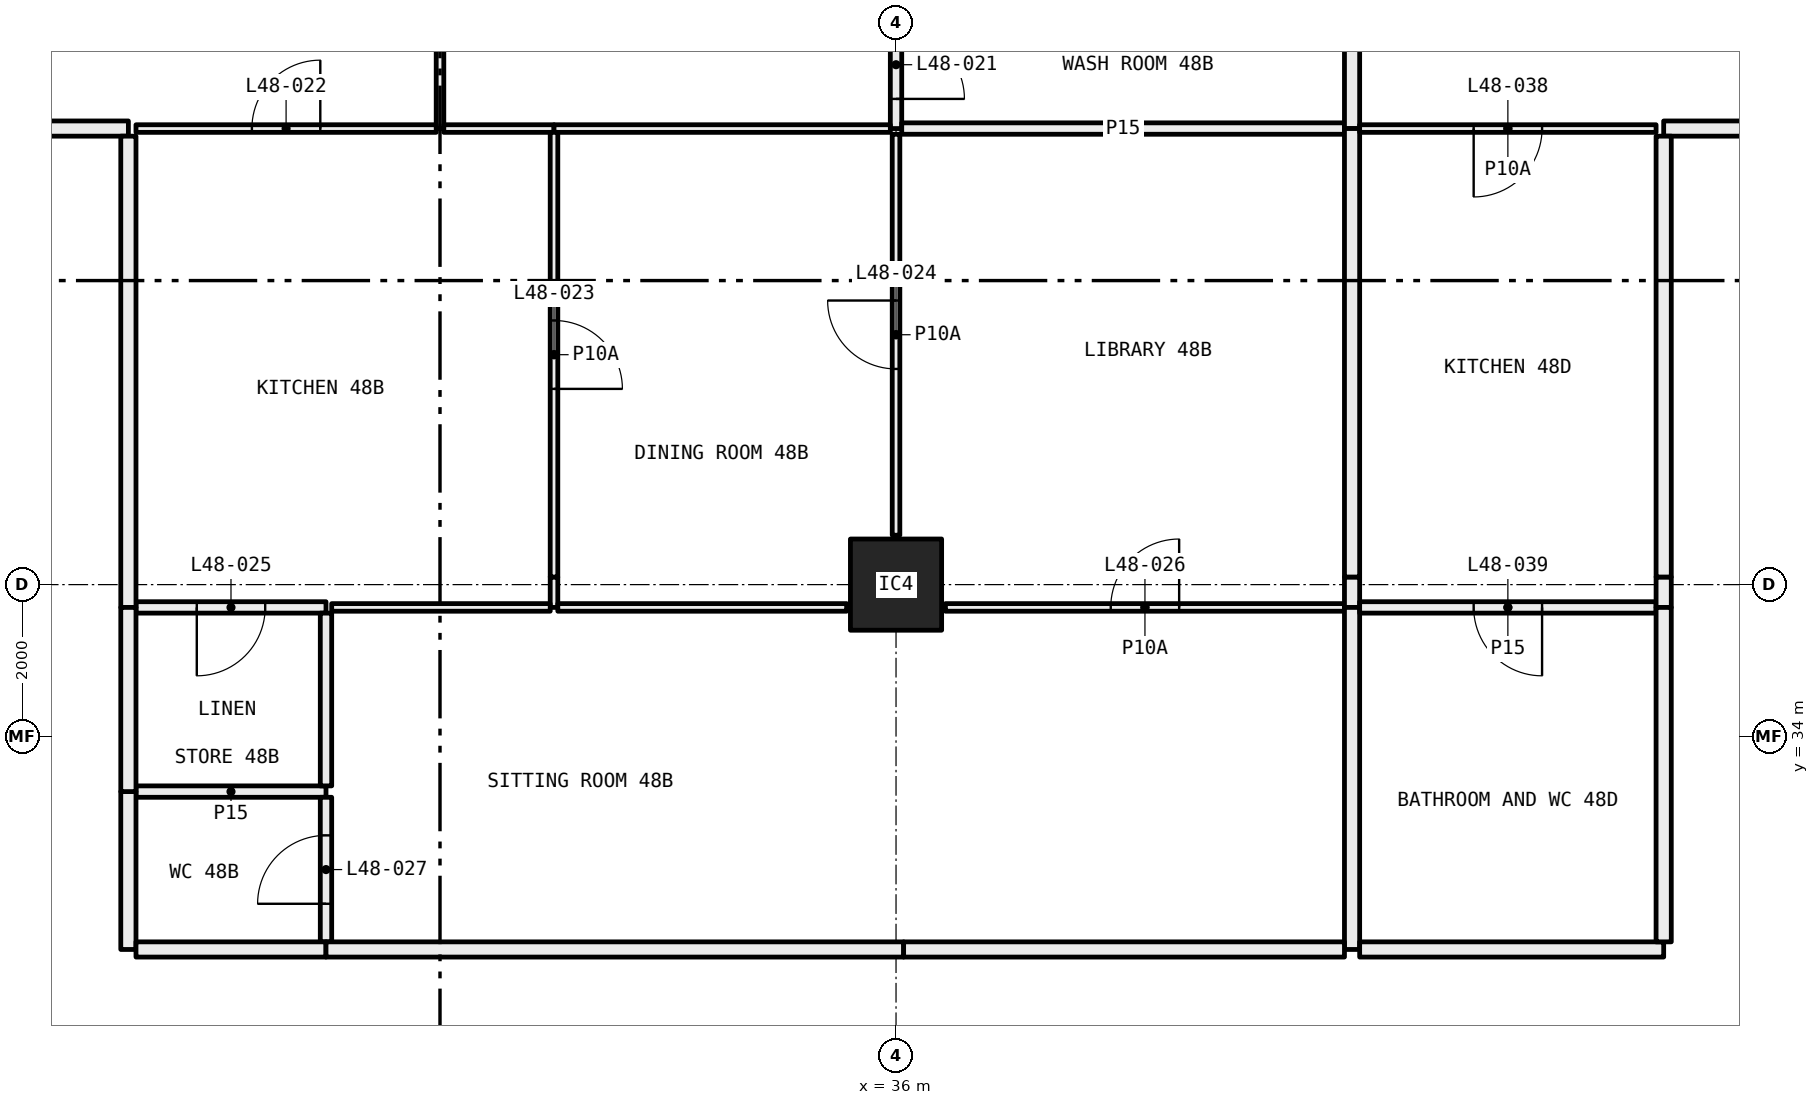
"""IFC4 building model, lengths in metres.
Left out: names, types, materials, properties, quantities, classifications, styles, units other than length and angle.
Written with IfcOpenShell. Run it as: python <this file> out.ifc"""

import sys

from ifc_helpers import new_model, si_unit, direction, frame, frame_2d, origin, origin_2d, place, context, subcontext, project, spatial, rectangle, hollow_rectangle, extrude, element, fill, save


model = new_model("IFC4")
c1 = context("Model", 3, precision=1e-05, world=origin(), true_north=direction((0.0, 1.0)))
c2 = subcontext(c1, "Body", "Model", "MODEL_VIEW")
j1 = project(units=[si_unit("LENGTHUNIT", "METRE"), si_unit("PLANEANGLEUNIT", "RADIAN")], contexts=[c1])
p1 = place(None, origin())
s1 = spatial("IfcSite", under=j1, at=p1, CompositionType="ELEMENT")
p2 = place(p1, origin())
s2 = spatial("IfcBuilding", under=s1, at=p2, CompositionType="ELEMENT")
p3 = place(p2, frame((0.0, 0.0, 182.4)))
s3 = spatial("IfcBuildingStorey", under=s2, at=p3, CompositionType="ELEMENT", Elevation=182.4)
p4 = place(p3, frame((36.0, 36.0, 0.0), z_axis=(0.0, 0.0, 1.0), x_axis=(1.0, 0.0, 0.0)))
e1 = element("IfcColumn", 1, at=p4, inside=s3, PredefinedType="COLUMN", context=c2, shape_type="SweptSolid", body=[
    extrude(hollow_rectangle(XDim=1.2, YDim=1.2, WallThickness=0.05, at=origin_2d()), origin(), (0.0, 0.0, 1.0), 3.05),
])
p5 = place(p3, frame((30.0, 42.0, 0.0), z_axis=(0.0, 0.0, 1.0), x_axis=(0.0, 1.0, 0.0)))
e2 = element("IfcWall", 2, at=p5, inside=s3, PredefinedType="PARTITIONING", context=c2, shape_type="SweptSolid", body=[
    extrude(rectangle(XDim=5.28, YDim=0.1, at=frame_2d((2.64, 0.0))), origin(), (0.0, 0.0, 1.0), 3.05),
])
p6 = place(p5, frame((2.19, 0.0, 0.0)))
e3 = element("IfcOpeningElement", 3, at=p6, cuts=e2, PredefinedType="OPENING", context=c2, shape_type="SweptSolid", body=[
    extrude(rectangle(XDim=0.9, YDim=2.1, at=frame_2d((0.45, 1.05))), frame((0.0, 0.06, 0.0), z_axis=(0.0, -1.0, 0.0), x_axis=(1.0, 0.0, 0.0)), (0.0, 0.0, 1.0), 0.12),
])
p7 = place(p3, frame((26.0, 42.0, 0.0), z_axis=(0.0, 0.0, 1.0), x_axis=(1.0, 0.0, 0.0)))
e4 = element("IfcWall", 4, at=p7, inside=s3, PredefinedType="PARTITIONING", context=c2, shape_type="SweptSolid", body=[
    extrude(rectangle(XDim=3.95, YDim=0.1, at=frame_2d((1.975, 0.0))), origin(), (0.0, 0.0, 1.0), 3.05),
])
p8 = place(p7, frame((1.525, 0.0, 0.0)))
e5 = element("IfcOpeningElement", 5, at=p8, cuts=e4, PredefinedType="OPENING", context=c2, shape_type="SweptSolid", body=[
    extrude(rectangle(XDim=0.9, YDim=2.1, at=frame_2d((0.45, 1.05))), frame((0.0, 0.06, 0.0), z_axis=(0.0, -1.0, 0.0), x_axis=(1.0, 0.0, 0.0)), (0.0, 0.0, 1.0), 0.12),
])
p9 = place(p3, frame((24.0, 42.0, 0.0), z_axis=(0.0, 0.0, 1.0), x_axis=(1.0, 0.0, 0.0)))
e6 = element("IfcWall", 6, at=p9, inside=s3, PredefinedType="PARTITIONING", context=c2, shape_type="SweptSolid", body=[
    extrude(rectangle(XDim=1.9, YDim=0.2, at=frame_2d((0.95, 0.0))), origin(), (0.0, 0.0, 1.0), 3.05),
])
p10 = place(p3, frame((36.0, 42.0, 0.0), z_axis=(0.0, 0.0, 1.0), x_axis=(0.0, 1.0, 0.0)))
e7 = element("IfcWall", 7, at=p10, inside=s3, PredefinedType="PARTITIONING", context=c2, shape_type="SweptSolid", body=[
    extrude(rectangle(XDim=1.68, YDim=0.15, at=frame_2d((0.84, 0.0))), origin(), (0.0, 0.0, 1.0), 2.45),
])
p11 = place(p10, frame((0.39, 0.0, 0.0)))
e8 = element("IfcOpeningElement", 8, at=p11, cuts=e7, PredefinedType="OPENING", context=c2, shape_type="SweptSolid", body=[
    extrude(rectangle(XDim=0.9, YDim=2.1, at=frame_2d((0.45, 1.05))), frame((0.0, 0.085, 0.0), z_axis=(0.0, -1.0, 0.0), x_axis=(1.0, 0.0, 0.0)), (0.0, 0.0, 1.0), 0.17),
])
p12 = place(p3, frame((30.05, 42.0, 0.0), z_axis=(0.0, 0.0, 1.0), x_axis=(1.0, 0.0, 0.0)))
e9 = element("IfcWall", 9, at=p12, inside=s3, PredefinedType="PARTITIONING", context=c2, shape_type="SweptSolid", body=[
    extrude(rectangle(XDim=1.45, YDim=0.1, at=frame_2d((0.725, 0.0))), origin(), (0.0, 0.0, 1.0), 3.05),
])
p13 = place(p3, frame((31.5, 42.0, 0.0), z_axis=(0.0, 0.0, 1.0), x_axis=(1.0, 0.0, 0.0)))
e10 = element("IfcWall", 10, at=p13, inside=s3, PredefinedType="PARTITIONING", context=c2, shape_type="SweptSolid", body=[
    extrude(rectangle(XDim=4.425, YDim=0.1, at=frame_2d((2.212, 0.0))), origin(), (0.0, 0.0, 1.0), 2.45),
])
p14 = place(p3, frame((36.075, 42.0, 0.0), z_axis=(0.0, 0.0, 1.0), x_axis=(1.0, 0.0, 0.0)))
e11 = element("IfcWall", 11, at=p14, inside=s3, PredefinedType="PARTITIONING", context=c2, shape_type="SweptSolid", body=[
    extrude(rectangle(XDim=5.825, YDim=0.15, at=frame_2d((2.913, 0.0))), origin(), (0.0, 0.0, 1.0), 2.45),
])
p15 = place(p3, frame((42.0, 42.0, 0.0), z_axis=(0.0, 0.0, 1.0), x_axis=(0.0, 1.0, 0.0)))
e12 = element("IfcWall", 12, at=p15, inside=s3, PredefinedType="PARTITIONING", context=c2, shape_type="SweptSolid", body=[
    extrude(rectangle(XDim=1.68, YDim=0.2, at=frame_2d((0.84, 0.0))), origin(), (0.0, 0.0, 1.0), 3.05),
])
p16 = place(p3, frame((31.5, 35.7, 0.0), z_axis=(0.0, 0.0, 1.0), x_axis=(0.0, 1.0, 0.0)))
e13 = element("IfcWall", 13, at=p16, inside=s3, PredefinedType="PARTITIONING", context=c2, shape_type="SweptSolid", body=[
    extrude(rectangle(XDim=0.4, YDim=0.1, at=frame_2d((0.2, 0.0))), origin(), (0.0, 0.0, 1.0), 2.45),
])
p17 = place(p3, frame((31.5, 36.1, 0.0), z_axis=(0.0, 0.0, 1.0), x_axis=(0.0, 1.0, 0.0)))
e14 = element("IfcWall", 14, at=p17, inside=s3, PredefinedType="PARTITIONING", context=c2, shape_type="SweptSolid", body=[
    extrude(rectangle(XDim=5.85, YDim=0.1, at=frame_2d((2.925, 0.0))), origin(), (0.0, 0.0, 1.0), 3.05),
])
p18 = place(p17, frame((2.475, 0.0, 0.0)))
e15 = element("IfcOpeningElement", 15, at=p18, cuts=e14, PredefinedType="OPENING", context=c2, shape_type="SweptSolid", body=[
    extrude(rectangle(XDim=0.9, YDim=2.1, at=frame_2d((0.45, 1.05))), frame((0.0, 0.06, 0.0), z_axis=(0.0, -1.0, 0.0), x_axis=(1.0, 0.0, 0.0)), (0.0, 0.0, 1.0), 0.12),
])
p19 = place(p3, frame((26.0, 35.7, 0.0), z_axis=(0.0, 0.0, 1.0), x_axis=(1.0, 0.0, 0.0)))
e16 = element("IfcWall", 16, at=p19, inside=s3, PredefinedType="PARTITIONING", context=c2, shape_type="SweptSolid", body=[
    extrude(rectangle(XDim=2.5, YDim=0.15, at=frame_2d((1.25, 0.0))), origin(), (0.0, 0.0, 1.0), 3.05),
])
p20 = place(p19, frame((0.8, 0.0, 0.0)))
e17 = element("IfcOpeningElement", 17, at=p20, cuts=e16, PredefinedType="OPENING", context=c2, shape_type="SweptSolid", body=[
    extrude(rectangle(XDim=0.9, YDim=2.1, at=frame_2d((0.45, 1.05))), frame((0.0, 0.085, 0.0), z_axis=(0.0, -1.0, 0.0), x_axis=(1.0, 0.0, 0.0)), (0.0, 0.0, 1.0), 0.17),
])
p21 = place(p3, frame((28.575, 35.7, 0.0), z_axis=(0.0, 0.0, 1.0), x_axis=(1.0, 0.0, 0.0)))
e18 = element("IfcWall", 18, at=p21, inside=s3, PredefinedType="PARTITIONING", context=c2, shape_type="SweptSolid", body=[
    extrude(rectangle(XDim=2.875, YDim=0.1, at=frame_2d((1.438, 0.0))), origin(), (0.0, 0.0, 1.0), 3.05),
])
p22 = place(p3, frame((25.9, 41.9, 0.0), z_axis=(0.0, 0.0, 1.0), x_axis=(0.0, -1.0, 0.0)))
e19 = element("IfcWall", 19, at=p22, inside=s3, PredefinedType="PARTITIONING", context=c2, shape_type="SweptSolid", body=[
    extrude(rectangle(XDim=6.2, YDim=0.2, at=frame_2d((3.1, 0.0))), origin(), (0.0, 0.0, 1.0), 2.45),
])
p23 = place(p3, frame((36.0, 36.65, 0.0), z_axis=(0.0, 0.0, 1.0), x_axis=(0.0, 1.0, 0.0)))
e20 = element("IfcWall", 20, at=p23, inside=s3, PredefinedType="PARTITIONING", context=c2, shape_type="SweptSolid", body=[
    extrude(rectangle(XDim=5.275, YDim=0.1, at=frame_2d((2.638, 0.0))), origin(), (0.0, 0.0, 1.0), 2.45),
])
p24 = place(p23, frame((2.188, 0.0, 0.0)))
e21 = element("IfcOpeningElement", 21, at=p24, cuts=e20, PredefinedType="OPENING", context=c2, shape_type="SweptSolid", body=[
    extrude(rectangle(XDim=0.9, YDim=2.1, at=frame_2d((0.45, 1.05))), frame((0.0, 0.06, 0.0), z_axis=(0.0, -1.0, 0.0), x_axis=(1.0, 0.0, 0.0)), (0.0, 0.0, 1.0), 0.12),
])
p25 = place(p3, frame((31.55, 35.7, 0.0), z_axis=(0.0, 0.0, 1.0), x_axis=(1.0, 0.0, 0.0)))
e22 = element("IfcWall", 22, at=p25, inside=s3, PredefinedType="PARTITIONING", context=c2, shape_type="SweptSolid", body=[
    extrude(rectangle(XDim=3.8, YDim=0.1, at=frame_2d((1.9, 0.0))), origin(), (0.0, 0.0, 1.0), 3.05),
])
p26 = place(p3, frame((36.65, 35.7, 0.0), z_axis=(0.0, 0.0, 1.0), x_axis=(1.0, 0.0, 0.0)))
e23 = element("IfcWall", 23, at=p26, inside=s3, PredefinedType="PARTITIONING", context=c2, shape_type="SweptSolid", body=[
    extrude(rectangle(XDim=5.25, YDim=0.1, at=frame_2d((2.625, 0.0))), origin(), (0.0, 0.0, 1.0), 3.05),
])
p27 = place(p26, frame((2.175, 0.0, 0.0)))
e24 = element("IfcOpeningElement", 24, at=p27, cuts=e23, PredefinedType="OPENING", context=c2, shape_type="SweptSolid", body=[
    extrude(rectangle(XDim=0.9, YDim=2.1, at=frame_2d((0.45, 1.05))), frame((0.0, 0.06, 0.0), z_axis=(0.0, -1.0, 0.0), x_axis=(1.0, 0.0, 0.0)), (0.0, 0.0, 1.0), 0.12),
])
p28 = place(p3, frame((42.0, 35.7, 0.0), z_axis=(0.0, 0.0, 1.0), x_axis=(0.0, 1.0, 0.0)))
e25 = element("IfcWall", 25, at=p28, inside=s3, PredefinedType="PARTITIONING", context=c2, shape_type="SweptSolid", body=[
    extrude(rectangle(XDim=0.4, YDim=0.2, at=frame_2d((0.2, 0.0))), origin(), (0.0, 0.0, 1.0), 2.45),
])
p29 = place(p3, frame((42.0, 36.1, 0.0), z_axis=(0.0, 0.0, 1.0), x_axis=(0.0, 1.0, 0.0)))
e26 = element("IfcWall", 26, at=p29, inside=s3, PredefinedType="PARTITIONING", context=c2, shape_type="SweptSolid", body=[
    extrude(rectangle(XDim=5.9, YDim=0.2, at=frame_2d((2.95, 0.0))), origin(), (0.0, 0.0, 1.0), 3.05),
])
p30 = place(p3, frame((28.5, 33.277, 0.0), z_axis=(0.0, 0.0, 1.0), x_axis=(-1.0, 0.0, 0.0)))
e27 = element("IfcWall", 27, at=p30, inside=s3, PredefinedType="PARTITIONING", context=c2, shape_type="SweptSolid", body=[
    extrude(rectangle(XDim=2.5, YDim=0.15, at=frame_2d((1.25, 0.0))), origin(), (0.0, 0.0, 1.0), 3.05),
])
p31 = place(p3, frame((28.5, 31.3, 0.0), z_axis=(0.0, 0.0, 1.0), x_axis=(0.0, 1.0, 0.0)))
e28 = element("IfcWall", 28, at=p31, inside=s3, PredefinedType="PARTITIONING", context=c2, shape_type="SweptSolid", body=[
    extrude(rectangle(XDim=1.902, YDim=0.15, at=frame_2d((0.951, 0.0))), origin(), (0.0, 0.0, 1.0), 3.05),
])
p32 = place(p31, frame((0.501, 0.0, 0.0)))
e29 = element("IfcOpeningElement", 29, at=p32, cuts=e28, PredefinedType="OPENING", context=c2, shape_type="SweptSolid", body=[
    extrude(rectangle(XDim=0.9, YDim=2.1, at=frame_2d((0.45, 1.05))), frame((0.0, 0.085, 0.0), z_axis=(0.0, -1.0, 0.0), x_axis=(1.0, 0.0, 0.0)), (0.0, 0.0, 1.0), 0.17),
])
p33 = place(p3, frame((25.9, 33.277, 0.0), z_axis=(0.0, 0.0, 1.0), x_axis=(0.0, -1.0, 0.0)))
e30 = element("IfcWall", 30, at=p33, inside=s3, PredefinedType="PARTITIONING", context=c2, shape_type="SweptSolid", body=[
    extrude(rectangle(XDim=2.077, YDim=0.2, at=frame_2d((1.039, 0.0))), origin(), (0.0, 0.0, 1.0), 3.05),
])
p34 = place(p3, frame((26.0, 31.2, 0.0), z_axis=(0.0, 0.0, 1.0), x_axis=(1.0, 0.0, 0.0)))
e31 = element("IfcWall", 31, at=p34, inside=s3, PredefinedType="PARTITIONING", context=c2, shape_type="SweptSolid", body=[
    extrude(rectangle(XDim=2.5, YDim=0.2, at=frame_2d((1.25, 0.0))), origin(), (0.0, 0.0, 1.0), 3.05),
])
p35 = place(p3, frame((28.5, 33.352, 0.0), z_axis=(0.0, 0.0, 1.0), x_axis=(0.0, 1.0, 0.0)))
e32 = element("IfcWall", 32, at=p35, inside=s3, PredefinedType="PARTITIONING", context=c2, shape_type="SweptSolid", body=[
    extrude(rectangle(XDim=2.273, YDim=0.15, at=frame_2d((1.136, 0.0))), origin(), (0.0, 0.0, 1.0), 3.05),
])
p36 = place(p3, frame((25.9, 35.7, 0.0), z_axis=(0.0, 0.0, 1.0), x_axis=(0.0, -1.0, 0.0)))
e33 = element("IfcWall", 33, at=p36, inside=s3, PredefinedType="PARTITIONING", context=c2, shape_type="SweptSolid", body=[
    extrude(rectangle(XDim=2.423, YDim=0.2, at=frame_2d((1.211, 0.0))), origin(), (0.0, 0.0, 1.0), 3.05),
])
p37 = place(p3, frame((42.0, 31.2, 0.0), z_axis=(0.0, 0.0, 1.0), x_axis=(0.0, 1.0, 0.0)))
e34 = element("IfcWall", 34, at=p37, inside=s3, PredefinedType="PARTITIONING", context=c2, shape_type="SweptSolid", body=[
    extrude(rectangle(XDim=4.5, YDim=0.2, at=frame_2d((2.25, 0.0))), origin(), (0.0, 0.0, 1.0), 3.05),
])
p38 = place(p3, frame((28.5, 31.2, 0.0), z_axis=(0.0, 0.0, 1.0), x_axis=(1.0, 0.0, 0.0)))
e35 = element("IfcWall", 35, at=p38, inside=s3, PredefinedType="PARTITIONING", context=c2, shape_type="SweptSolid", body=[
    extrude(rectangle(XDim=7.6, YDim=0.2, at=frame_2d((3.8, 0.0))), origin(), (0.0, 0.0, 1.0), 2.45),
])
p39 = place(p3, frame((36.1, 31.2, 0.0), z_axis=(0.0, 0.0, 1.0), x_axis=(1.0, 0.0, 0.0)))
e36 = element("IfcWall", 36, at=p39, inside=s3, PredefinedType="PARTITIONING", context=c2, shape_type="SweptSolid", body=[
    extrude(rectangle(XDim=5.8, YDim=0.2, at=frame_2d((2.9, 0.0))), origin(), (0.0, 0.0, 1.0), 3.05),
])
p40 = place(p3, frame((42.1, 42.0, 0.0), z_axis=(0.0, 0.0, 1.0), x_axis=(1.0, 0.0, 0.0)))
e37 = element("IfcWall", 37, at=p40, inside=s3, PredefinedType="PARTITIONING", context=c2, shape_type="SweptSolid", body=[
    extrude(rectangle(XDim=3.9, YDim=0.1, at=frame_2d((1.95, 0.0))), origin(), (0.0, 0.0, 1.0), 3.05),
])
p41 = place(p40, frame((1.5, 0.0, 0.0)))
e38 = element("IfcOpeningElement", 38, at=p41, cuts=e37, PredefinedType="OPENING", context=c2, shape_type="SweptSolid", body=[
    extrude(rectangle(XDim=0.9, YDim=2.1, at=frame_2d((0.45, 1.05))), frame((0.0, 0.06, 0.0), z_axis=(0.0, -1.0, 0.0), x_axis=(1.0, 0.0, 0.0)), (0.0, 0.0, 1.0), 0.12),
])
p42 = place(p3, frame((46.1, 42.0, 0.0), z_axis=(0.0, 0.0, 1.0), x_axis=(1.0, 0.0, 0.0)))
e39 = element("IfcWall", 39, at=p42, inside=s3, PredefinedType="PARTITIONING", context=c2, shape_type="SweptSolid", body=[
    extrude(rectangle(XDim=1.9, YDim=0.2, at=frame_2d((0.95, 0.0))), origin(), (0.0, 0.0, 1.0), 3.05),
])
p43 = place(p3, frame((42.1, 35.7, 0.0), z_axis=(0.0, 0.0, 1.0), x_axis=(1.0, 0.0, 0.0)))
e40 = element("IfcWall", 40, at=p43, inside=s3, PredefinedType="PARTITIONING", context=c2, shape_type="SweptSolid", body=[
    extrude(rectangle(XDim=3.9, YDim=0.15, at=frame_2d((1.95, 0.0))), origin(), (0.0, 0.0, 1.0), 3.05),
])
p44 = place(p43, frame((1.5, 0.0, 0.0)))
e41 = element("IfcOpeningElement", 41, at=p44, cuts=e40, PredefinedType="OPENING", context=c2, shape_type="SweptSolid", body=[
    extrude(rectangle(XDim=0.9, YDim=2.1, at=frame_2d((0.45, 1.05))), frame((0.0, 0.085, 0.0), z_axis=(0.0, -1.0, 0.0), x_axis=(1.0, 0.0, 0.0)), (0.0, 0.0, 1.0), 0.17),
])
p45 = place(p3, frame((46.1, 35.7, 0.0), z_axis=(0.0, 0.0, 1.0), x_axis=(0.0, 1.0, 0.0)))
e42 = element("IfcWall", 42, at=p45, inside=s3, PredefinedType="PARTITIONING", context=c2, shape_type="SweptSolid", body=[
    extrude(rectangle(XDim=0.4, YDim=0.2, at=frame_2d((0.2, 0.0))), origin(), (0.0, 0.0, 1.0), 2.45),
])
p46 = place(p3, frame((46.1, 36.1, 0.0), z_axis=(0.0, 0.0, 1.0), x_axis=(0.0, 1.0, 0.0)))
e43 = element("IfcWall", 43, at=p46, inside=s3, PredefinedType="PARTITIONING", context=c2, shape_type="SweptSolid", body=[
    extrude(rectangle(XDim=5.8, YDim=0.2, at=frame_2d((2.9, 0.0))), origin(), (0.0, 0.0, 1.0), 3.05),
])
p47 = place(p3, frame((42.1, 31.2, 0.0), z_axis=(0.0, 0.0, 1.0), x_axis=(1.0, 0.0, 0.0)))
e44 = element("IfcWall", 44, at=p47, inside=s3, PredefinedType="PARTITIONING", context=c2, shape_type="SweptSolid", body=[
    extrude(rectangle(XDim=4.0, YDim=0.2, at=frame_2d((2.0, 0.0))), origin(), (0.0, 0.0, 1.0), 3.05),
])
p48 = place(p3, frame((46.1, 31.3, 0.0), z_axis=(0.0, 0.0, 1.0), x_axis=(0.0, 1.0, 0.0)))
e45 = element("IfcWall", 45, at=p48, inside=s3, PredefinedType="PARTITIONING", context=c2, shape_type="SweptSolid", body=[
    extrude(rectangle(XDim=4.4, YDim=0.2, at=frame_2d((2.2, 0.0))), origin(), (0.0, 0.0, 1.0), 3.05),
])
p49 = place(p11, frame((0.9, 0.0, 0.0), x_axis=(-1.0, 0.0, 0.0)))
e46 = element("IfcDoor", 46, at=p49, inside=s3, OperationType="SINGLE_SWING_LEFT", PredefinedType="DOOR", context=c2, shape_type="SweptSolid", body=[
    extrude(rectangle(XDim=0.9, YDim=2.1, at=frame_2d((0.45, 1.05))), frame((0.0, 0.025, 0.0), z_axis=(0.0, -1.0, 0.0), x_axis=(1.0, 0.0, 0.0)), (0.0, 0.0, 1.0), 0.05),
])
fill(e8, e46)
p50 = place(p8, origin())
e47 = element("IfcDoor", 47, at=p50, inside=s3, OperationType="SINGLE_SWING_LEFT", PredefinedType="DOOR", context=c2, shape_type="SweptSolid", body=[
    extrude(rectangle(XDim=0.9, YDim=2.1, at=frame_2d((0.45, 1.05))), frame((0.0, 0.025, 0.0), z_axis=(0.0, -1.0, 0.0), x_axis=(1.0, 0.0, 0.0)), (0.0, 0.0, 1.0), 0.05),
])
fill(e5, e47)
p51 = place(p18, frame((0.9, 0.0, 0.0), x_axis=(-1.0, 0.0, 0.0)))
e48 = element("IfcDoor", 48, at=p51, inside=s3, OperationType="SINGLE_SWING_LEFT", PredefinedType="DOOR", context=c2, shape_type="SweptSolid", body=[
    extrude(rectangle(XDim=0.9, YDim=2.1, at=frame_2d((0.45, 1.05))), frame((0.0, 0.025, 0.0), z_axis=(0.0, -1.0, 0.0), x_axis=(1.0, 0.0, 0.0)), (0.0, 0.0, 1.0), 0.05),
])
fill(e15, e48)
p52 = place(p24, origin())
e49 = element("IfcDoor", 49, at=p52, inside=s3, OperationType="SINGLE_SWING_LEFT", PredefinedType="DOOR", context=c2, shape_type="SweptSolid", body=[
    extrude(rectangle(XDim=0.9, YDim=2.1, at=frame_2d((0.45, 1.05))), frame((0.0, 0.025, 0.0), z_axis=(0.0, -1.0, 0.0), x_axis=(1.0, 0.0, 0.0)), (0.0, 0.0, 1.0), 0.05),
])
fill(e21, e49)
p53 = place(p20, frame((0.9, 0.0, 0.0), x_axis=(-1.0, 0.0, 0.0)))
e50 = element("IfcDoor", 50, at=p53, inside=s3, OperationType="SINGLE_SWING_LEFT", PredefinedType="DOOR", context=c2, shape_type="SweptSolid", body=[
    extrude(rectangle(XDim=0.9, YDim=2.1, at=frame_2d((0.45, 1.05))), frame((0.0, 0.025, 0.0), z_axis=(0.0, -1.0, 0.0), x_axis=(1.0, 0.0, 0.0)), (0.0, 0.0, 1.0), 0.05),
])
fill(e17, e50)
p54 = place(p27, origin())
e51 = element("IfcDoor", 51, at=p54, inside=s3, OperationType="SINGLE_SWING_LEFT", PredefinedType="DOOR", context=c2, shape_type="SweptSolid", body=[
    extrude(rectangle(XDim=0.9, YDim=2.1, at=frame_2d((0.45, 1.05))), frame((0.0, 0.025, 0.0), z_axis=(0.0, -1.0, 0.0), x_axis=(1.0, 0.0, 0.0)), (0.0, 0.0, 1.0), 0.05),
])
fill(e24, e51)
p55 = place(p32, origin())
e52 = element("IfcDoor", 52, at=p55, inside=s3, OperationType="SINGLE_SWING_RIGHT", PredefinedType="DOOR", context=c2, shape_type="SweptSolid", body=[
    extrude(rectangle(XDim=0.9, YDim=2.1, at=frame_2d((0.45, 1.05))), frame((0.0, 0.025, 0.0), z_axis=(0.0, -1.0, 0.0), x_axis=(1.0, 0.0, 0.0)), (0.0, 0.0, 1.0), 0.05),
])
fill(e29, e52)
p56 = place(p41, frame((0.9, 0.0, 0.0), x_axis=(-1.0, 0.0, 0.0)))
e53 = element("IfcDoor", 53, at=p56, inside=s3, OperationType="SINGLE_SWING_LEFT", PredefinedType="DOOR", context=c2, shape_type="SweptSolid", body=[
    extrude(rectangle(XDim=0.9, YDim=2.1, at=frame_2d((0.45, 1.05))), frame((0.0, 0.025, 0.0), z_axis=(0.0, -1.0, 0.0), x_axis=(1.0, 0.0, 0.0)), (0.0, 0.0, 1.0), 0.05),
])
fill(e38, e53)
p57 = place(p44, frame((0.9, 0.0, 0.0), x_axis=(-1.0, 0.0, 0.0)))
e54 = element("IfcDoor", 54, at=p57, inside=s3, OperationType="SINGLE_SWING_RIGHT", PredefinedType="DOOR", context=c2, shape_type="SweptSolid", body=[
    extrude(rectangle(XDim=0.9, YDim=2.1, at=frame_2d((0.45, 1.05))), frame((0.0, 0.025, 0.0), z_axis=(0.0, -1.0, 0.0), x_axis=(1.0, 0.0, 0.0)), (0.0, 0.0, 1.0), 0.05),
])
fill(e41, e54)
save(model, sys.argv[1])
